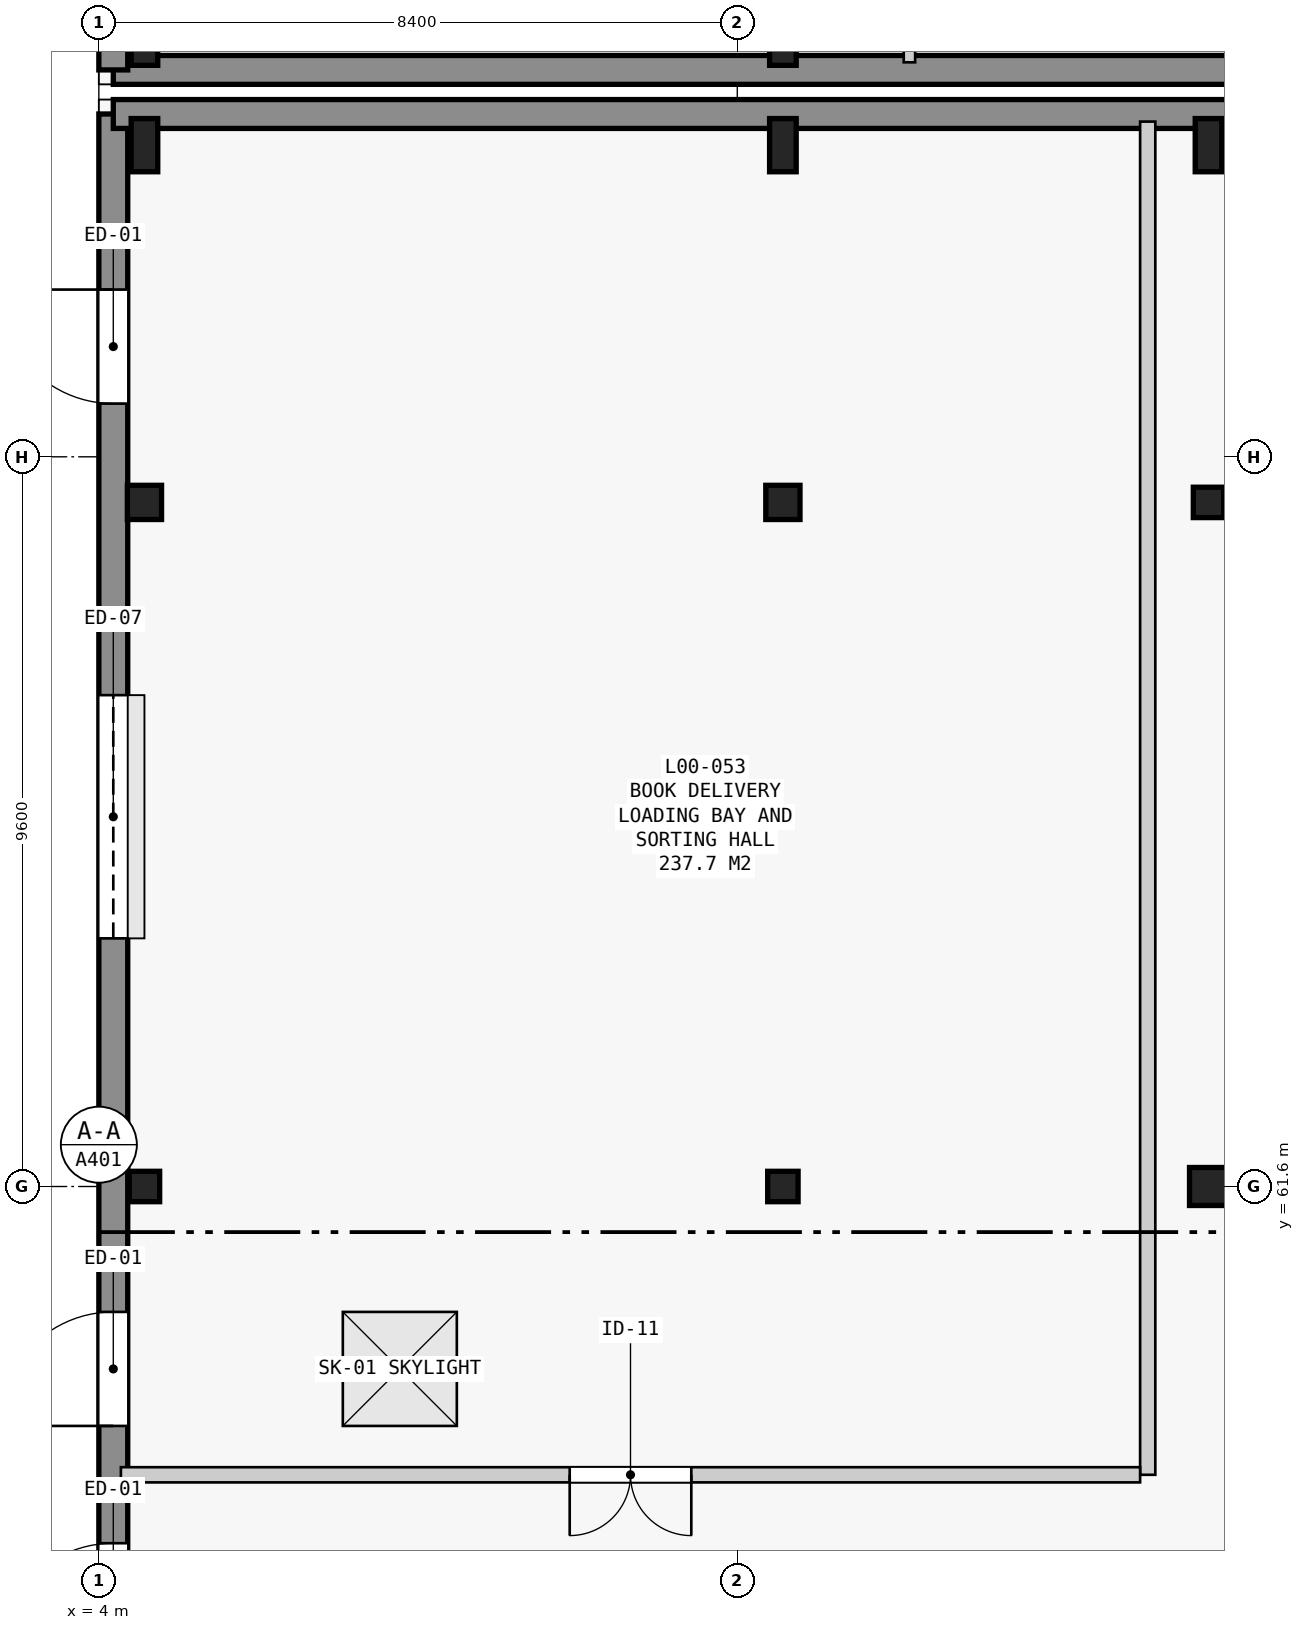
"""IFC4 building model, lengths in metres.
Left out: names, types, materials, properties, quantities, classifications, styles, units other than length and angle.
Written with IfcOpenShell. Run it as: python <this file> out.ifc"""

import sys

from ifc_helpers import new_model, si_unit, direction, frame, frame_2d, origin, origin_2d, place, context, subcontext, project, spatial, rectangle, extrude, element, fill, save


model = new_model("IFC4")
c1 = context("Model", 3, precision=1e-05, world=origin(), true_north=direction((0.0, 1.0)))
c2 = subcontext(c1, "Body", "Model", "MODEL_VIEW")
j1 = project(units=[si_unit("LENGTHUNIT", "METRE"), si_unit("PLANEANGLEUNIT", "RADIAN")], contexts=[c1])
p1 = place(None, origin())
s1 = spatial("IfcSite", under=j1, at=p1, CompositionType="ELEMENT")
p2 = place(p1, origin())
s2 = spatial("IfcBuilding", under=s1, at=p2, CompositionType="ELEMENT")
p3 = place(p2, origin())
s3 = spatial("IfcBuildingStorey", under=s2, at=p3, CompositionType="ELEMENT", Elevation=0.0)
for number, where, z_axis, x_axis in (
    (1, (4.6, 76.7, 0.0), (0.0, 0.0, 1.0), (1.0, 0.0, 0.0)),
    (2, (13.0, 76.7, 0.0), (0.0, 0.0, 1.0), (1.0, 0.0, 0.0)),
):
    element("IfcColumn", number, at=place(p3, frame(where, z_axis=z_axis, x_axis=x_axis)), inside=s3, PredefinedType="COLUMN", context=c2, shape_type="SweptSolid", body=[
        extrude(rectangle(XDim=0.35, YDim=0.7, at=origin_2d()), origin(), (0.0, 0.0, 1.0), 5.4),
    ])
p4 = place(p3, frame((4.6, 61.6, 0.0), z_axis=(0.0, 0.0, 1.0), x_axis=(1.0, 0.0, 0.0)))
e3 = element("IfcColumn", 3, at=p4, inside=s3, PredefinedType="COLUMN", context=c2, shape_type="SweptSolid", body=[
    extrude(rectangle(XDim=0.4, YDim=0.4, at=origin_2d()), origin(), (0.0, 0.0, 1.0), 5.4),
])
p5 = place(p3, frame((4.6, 70.6, 0.0), z_axis=(0.0, 0.0, 1.0), x_axis=(1.0, 0.0, 0.0)))
e4 = element("IfcColumn", 4, at=p5, inside=s3, PredefinedType="COLUMN", context=c2, shape_type="SweptSolid", body=[
    extrude(rectangle(XDim=0.45, YDim=0.45, at=origin_2d()), origin(), (0.0, 0.0, 1.0), 5.4),
])
p6 = place(p3, frame((4.6, 75.3, 0.0), z_axis=(0.0, 0.0, 1.0), x_axis=(1.0, 0.0, 0.0)))
e5 = element("IfcColumn", 5, at=p6, inside=s3, PredefinedType="COLUMN", context=c2, shape_type="SweptSolid", body=[
    extrude(rectangle(XDim=0.35, YDim=0.7, at=origin_2d()), origin(), (0.0, 0.0, 1.0), 5.4),
])
p7 = place(p3, frame((13.0, 61.6, 0.0), z_axis=(0.0, 0.0, 1.0), x_axis=(1.0, 0.0, 0.0)))
e6 = element("IfcColumn", 6, at=p7, inside=s3, PredefinedType="COLUMN", context=c2, shape_type="SweptSolid", body=[
    extrude(rectangle(XDim=0.4, YDim=0.4, at=origin_2d()), origin(), (0.0, 0.0, 1.0), 5.4),
])
p8 = place(p3, frame((13.0, 70.6, 0.0), z_axis=(0.0, 0.0, 1.0), x_axis=(1.0, 0.0, 0.0)))
e7 = element("IfcColumn", 7, at=p8, inside=s3, PredefinedType="COLUMN", context=c2, shape_type="SweptSolid", body=[
    extrude(rectangle(XDim=0.45, YDim=0.45, at=origin_2d()), origin(), (0.0, 0.0, 1.0), 5.4),
])
p9 = place(p3, frame((13.0, 75.3, 0.0), z_axis=(0.0, 0.0, 1.0), x_axis=(1.0, 0.0, 0.0)))
e8 = element("IfcColumn", 8, at=p9, inside=s3, PredefinedType="COLUMN", context=c2, shape_type="SweptSolid", body=[
    extrude(rectangle(XDim=0.35, YDim=0.7, at=origin_2d()), origin(), (0.0, 0.0, 1.0), 5.4),
])
p10 = place(p3, frame((18.6, 61.6, 0.0), z_axis=(0.0, 0.0, 1.0), x_axis=(1.0, 0.0, 0.0)))
e9 = element("IfcColumn", 9, at=p10, inside=s3, PredefinedType="COLUMN", context=c2, shape_type="SweptSolid", body=[
    extrude(rectangle(XDim=0.5, YDim=0.5, at=origin_2d()), origin(), (0.0, 0.0, 1.0), 5.4),
])
p11 = place(p3, frame((18.6, 70.6, 0.0), z_axis=(0.0, 0.0, 1.0), x_axis=(1.0, 0.0, 0.0)))
e10 = element("IfcColumn", 10, at=p11, inside=s3, PredefinedType="COLUMN", context=c2, shape_type="SweptSolid", body=[
    extrude(rectangle(XDim=0.4, YDim=0.4, at=origin_2d()), origin(), (0.0, 0.0, 1.0), 5.4),
])
p12 = place(p3, frame((18.6, 75.3, 0.0), z_axis=(0.0, 0.0, 1.0), x_axis=(1.0, 0.0, 0.0)))
e11 = element("IfcColumn", 11, at=p12, inside=s3, PredefinedType="COLUMN", context=c2, shape_type="SweptSolid", body=[
    extrude(rectangle(XDim=0.35, YDim=0.7, at=origin_2d()), origin(), (0.0, 0.0, 1.0), 5.4),
])
p13 = place(p3, frame((45.71, 76.29, 0.0), z_axis=(0.0, 0.0, 1.0), x_axis=(-1.0, 0.0, 0.0)))
e12 = element("IfcWall", 12, at=p13, inside=s3, PredefinedType="STANDARD", context=c2, shape_type="SweptSolid", body=[
    extrude(rectangle(XDim=41.52, YDim=0.38, at=frame_2d((20.76, 0.0))), origin(), (0.0, 0.0, 1.0), 5.08),
])
p14 = place(p3, frame((4.19, 76.29, 0.0), z_axis=(0.0, 0.0, 1.0), x_axis=(0.0, 1.0, 0.0)))
e13 = element("IfcWall", 13, at=p14, inside=s3, PredefinedType="STANDARD", context=c2, shape_type="SweptSolid", body=[
    extrude(rectangle(XDim=41.52, YDim=0.38, at=frame_2d((20.76, 0.0))), origin(), (0.0, 0.0, 1.0), 5.14),
])
p15 = place(p14, frame((20.01, 0.0, 0.0)))
e14 = element("IfcOpeningElement", 14, at=p15, cuts=e13, PredefinedType="OPENING", context=c2, shape_type="SweptSolid", body=[
    extrude(rectangle(XDim=1.5, YDim=2.3, at=frame_2d((0.75, 1.15))), frame((0.0, 0.2, 0.0), z_axis=(0.0, -1.0, 0.0), x_axis=(1.0, 0.0, 0.0)), (0.0, 0.0, 1.0), 0.4),
])
p16 = place(p14, frame((29.31, 0.0, 0.0)))
e15 = element("IfcOpeningElement", 15, at=p16, cuts=e13, PredefinedType="OPENING", context=c2, shape_type="SweptSolid", body=[
    extrude(rectangle(XDim=1.5, YDim=2.3, at=frame_2d((0.75, 1.15))), frame((0.0, 0.2, 0.0), z_axis=(0.0, -1.0, 0.0), x_axis=(1.0, 0.0, 0.0)), (0.0, 0.0, 1.0), 0.4),
])
p17 = place(p3, frame((4.19, 42.69, 0.0), z_axis=(0.0, 0.0, 1.0), x_axis=(0.0, 1.0, 0.0)))
e16 = element("IfcWall", 16, at=p17, inside=s3, PredefinedType="STANDARD", context=c2, shape_type="SweptSolid", body=[
    extrude(rectangle(XDim=33.02, YDim=0.38, at=frame_2d((16.51, 0.0))), origin(), (0.0, 0.0, 1.0), 5.14),
])
p18 = place(p17, frame((12.717, 0.0, 0.0)))
e17 = element("IfcOpeningElement", 17, at=p18, cuts=e16, PredefinedType="OPENING", context=c2, shape_type="SweptSolid", body=[
    extrude(rectangle(XDim=1.5, YDim=2.3, at=frame_2d((0.75, 1.15))), frame((0.0, 0.2, 0.0), z_axis=(0.0, -1.0, 0.0), x_axis=(1.0, 0.0, 0.0)), (0.0, 0.0, 1.0), 0.4),
])
p19 = place(p17, frame((22.174, 0.0, 0.0)))
e18 = element("IfcOpeningElement", 18, at=p19, cuts=e16, PredefinedType="OPENING", context=c2, shape_type="SweptSolid", body=[
    extrude(rectangle(XDim=3.2, YDim=3.6, at=frame_2d((1.6, 1.8))), frame((0.0, 0.2, 0.0), z_axis=(0.0, -1.0, 0.0), x_axis=(1.0, 0.0, 0.0)), (0.0, 0.0, 1.0), 0.4),
])
p20 = place(p17, frame((15.76, 0.0, 0.0)))
e19 = element("IfcOpeningElement", 19, at=p20, cuts=e16, PredefinedType="OPENING", context=c2, shape_type="SweptSolid", body=[
    extrude(rectangle(XDim=1.5, YDim=2.3, at=frame_2d((0.75, 1.15))), frame((0.0, 0.2, 0.0), z_axis=(0.0, -1.0, 0.0), x_axis=(1.0, 0.0, 0.0)), (0.0, 0.0, 1.0), 0.4),
])
p21 = place(p17, frame((4.31, 0.0, 0.0)))
e20 = element("IfcOpeningElement", 20, at=p21, cuts=e16, PredefinedType="OPENING", context=c2, shape_type="SweptSolid", body=[
    extrude(rectangle(XDim=1.5, YDim=2.3, at=frame_2d((0.75, 1.15))), frame((0.0, 0.2, 0.0), z_axis=(0.0, -1.0, 0.0), x_axis=(1.0, 0.0, 0.0)), (0.0, 0.0, 1.0), 0.4),
])
p22 = place(p17, frame((29.21, 0.0, 0.0)))
e21 = element("IfcOpeningElement", 21, at=p22, cuts=e16, PredefinedType="OPENING", context=c2, shape_type="SweptSolid", body=[
    extrude(rectangle(XDim=1.5, YDim=2.3, at=frame_2d((0.75, 1.15))), frame((0.0, 0.2, 0.0), z_axis=(0.0, -1.0, 0.0), x_axis=(1.0, 0.0, 0.0)), (0.0, 0.0, 1.0), 0.4),
])
p23 = place(p3, frame((4.19, 75.71, 0.0), z_axis=(0.0, 0.0, 1.0), x_axis=(1.0, 0.0, 0.0)))
e22 = element("IfcWall", 22, at=p23, inside=s3, PredefinedType="STANDARD", context=c2, shape_type="SweptSolid", body=[
    extrude(rectangle(XDim=41.52, YDim=0.38, at=frame_2d((20.76, 0.0))), origin(), (0.0, 0.0, 1.0), 5.14),
])
p24 = place(p3, frame((14.665, 94.72, 0.0), z_axis=(0.0, 0.0, 1.0), x_axis=(0.0, -1.0, 0.0)))
e23 = element("IfcWall", 23, at=p24, inside=s3, PredefinedType="PARTITIONING", context=c2, shape_type="SweptSolid", body=[
    extrude(rectangle(XDim=18.33, YDim=0.15, at=frame_2d((9.165, 0.0))), origin(), (0.0, 0.0, 1.0), 4.26),
])
p25 = place(p24, frame((7.915, 0.0, 0.0)))
e24 = element("IfcOpeningElement", 24, at=p25, cuts=e23, PredefinedType="OPENING", context=c2, shape_type="SweptSolid", body=[
    extrude(rectangle(XDim=1.1, YDim=2.15, at=frame_2d((0.55, 1.075))), frame((0.0, 0.085, 0.0), z_axis=(0.0, -1.0, 0.0), x_axis=(1.0, 0.0, 0.0)), (0.0, 0.0, 1.0), 0.17),
])
p26 = place(p3, frame((17.8, 75.61, 0.0), z_axis=(0.0, 0.0, 1.0), x_axis=(0.0, -1.0, 0.0)))
e25 = element("IfcWall", 25, at=p26, inside=s3, PredefinedType="STANDARD", context=c2, shape_type="SweptSolid", body=[
    extrude(rectangle(XDim=17.803, YDim=0.2, at=frame_2d((8.901, 0.0))), origin(), (0.0, 0.0, 1.0), 4.52),
])
p27 = place(p3, frame((17.7, 57.807, 0.0), z_axis=(0.0, 0.0, 1.0), x_axis=(-1.0, 0.0, 0.0)))
e26 = element("IfcWall", 26, at=p27, inside=s3, PredefinedType="STANDARD", context=c2, shape_type="SweptSolid", body=[
    extrude(rectangle(XDim=13.41, YDim=0.2, at=frame_2d((6.705, 0.0))), origin(), (0.0, 0.0, 1.0), 4.47),
])
p28 = place(p27, frame((5.905, 0.0, 0.0)))
e27 = element("IfcOpeningElement", 27, at=p28, cuts=e26, PredefinedType="OPENING", context=c2, shape_type="SweptSolid", body=[
    extrude(rectangle(XDim=1.6, YDim=2.25, at=frame_2d((0.8, 1.125))), frame((0.0, 0.11, 0.0), z_axis=(0.0, -1.0, 0.0), x_axis=(1.0, 0.0, 0.0)), (0.0, 0.0, 1.0), 0.22),
])
p29 = place(p18, origin())
e28 = element("IfcDoor", 28, at=p29, inside=s3, OperationType="SINGLE_SWING_LEFT", PredefinedType="DOOR", context=c2, shape_type="SweptSolid", body=[
    extrude(rectangle(XDim=1.5, YDim=2.3, at=frame_2d((0.75, 1.15))), frame((0.0, 0.025, 0.0), z_axis=(0.0, -1.0, 0.0), x_axis=(1.0, 0.0, 0.0)), (0.0, 0.0, 1.0), 0.05),
])
fill(e17, e28)
p30 = place(p19, origin())
e29 = element("IfcDoor", 29, at=p30, inside=s3, OperationType="ROLLINGUP", PredefinedType="DOOR", context=c2, shape_type="SweptSolid", body=[
    extrude(rectangle(XDim=3.2, YDim=3.6, at=frame_2d((1.6, 1.8))), frame((0.0, 0.025, 0.0), z_axis=(0.0, -1.0, 0.0), x_axis=(1.0, 0.0, 0.0)), (0.0, 0.0, 1.0), 0.05),
])
fill(e18, e29)
p31 = place(p20, origin())
e30 = element("IfcDoor", 30, at=p31, inside=s3, OperationType="SINGLE_SWING_LEFT", PredefinedType="DOOR", context=c2, shape_type="SweptSolid", body=[
    extrude(rectangle(XDim=1.5, YDim=2.3, at=frame_2d((0.75, 1.15))), frame((0.0, 0.025, 0.0), z_axis=(0.0, -1.0, 0.0), x_axis=(1.0, 0.0, 0.0)), (0.0, 0.0, 1.0), 0.05),
])
fill(e19, e30)
p32 = place(p2, frame((0.0, 0.0, 26.7)))
p33 = place(p32, frame((0.0, 0.0, -21.56)))
p34 = place(p33, frame((7.96, 59.2, 0.0)))
p35 = place(p34, frame((0.0, 0.0, 0.21)))
e31 = element("IfcWindow", 31, at=p35, inside=s3, PartitioningType="SINGLE_PANEL", PredefinedType="SKYLIGHT", context=c2, shape_type="SweptSolid", body=[
    extrude(rectangle(XDim=1.5, YDim=1.5, at=origin_2d()), origin(), (0.0, 0.0, 1.0), 0.05),
])
p36 = place(p22, origin())
e32 = element("IfcDoor", 32, at=p36, inside=s3, OperationType="SINGLE_SWING_RIGHT", PredefinedType="DOOR", context=c2, shape_type="SweptSolid", body=[
    extrude(rectangle(XDim=1.5, YDim=2.3, at=frame_2d((0.75, 1.15))), frame((0.0, 0.025, 0.0), z_axis=(0.0, -1.0, 0.0), x_axis=(1.0, 0.0, 0.0)), (0.0, 0.0, 1.0), 0.05),
])
fill(e21, e32)
p37 = place(p28, origin())
e33 = element("IfcDoor", 33, at=p37, inside=s3, OperationType="DOUBLE_DOOR_SINGLE_SWING", PredefinedType="DOOR", context=c2, shape_type="SweptSolid", body=[
    extrude(rectangle(XDim=1.6, YDim=2.25, at=frame_2d((0.8, 1.125))), frame((0.0, 0.025, 0.0), z_axis=(0.0, -1.0, 0.0), x_axis=(1.0, 0.0, 0.0)), (0.0, 0.0, 1.0), 0.05),
])
fill(e27, e33)
save(model, sys.argv[1])
